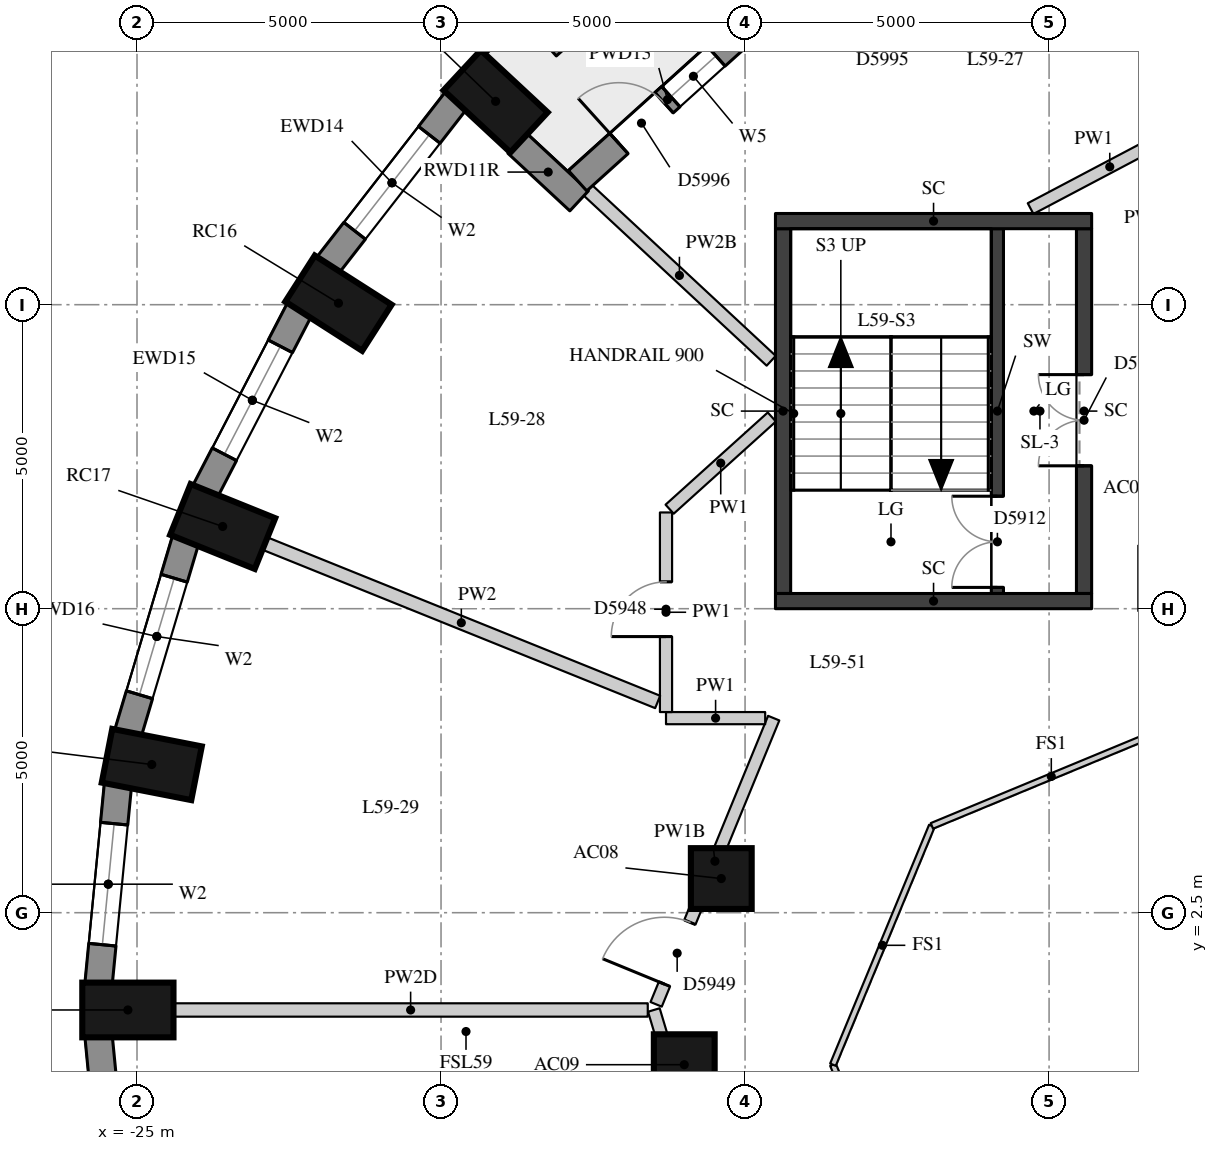
"""IFC4 building model, lengths in metres.
Left out: names, types, materials, properties, quantities, classifications, styles, units other than length and angle.
Written with IfcOpenShell. Run it as: python <this file> out.ifc"""

import sys

from ifc_helpers import new_model, si_unit, direction, frame, frame_2d, origin, origin_2d, place, context, subcontext, project, spatial, rectangle, extrude, element, fill, save


model = new_model("IFC4")
c1 = context("Model", 3, precision=1e-05, world=origin(), true_north=direction((0.0, 1.0)))
c2 = subcontext(c1, "Body", "Model", "MODEL_VIEW")
j1 = project(units=[si_unit("LENGTHUNIT", "METRE"), si_unit("PLANEANGLEUNIT", "RADIAN")], contexts=[c1])
p1 = place(None, origin())
s1 = spatial("IfcSite", under=j1, at=p1, CompositionType="ELEMENT")
p2 = place(p1, origin())
s2 = spatial("IfcBuilding", under=s1, at=p2, CompositionType="ELEMENT")
p3 = place(p2, frame((0.0, 0.0, 209.0)))
s3 = spatial("IfcBuildingStorey", under=s2, at=p3, CompositionType="ELEMENT", Elevation=209.0)
for number, where, z_axis, x_axis in (
    (1, (-19.102, 15.845, 0.0), (0.0, 0.0, 1.0), (-0.732, 0.681, 0.0)),
    (2, (-21.687, 12.525, 0.0), (0.0, 0.0, 1.0), (-0.842, 0.539, 0.0)),
    (3, (-23.591, 8.852, 0.0), (0.0, 0.0, 1.0), (-0.927, 0.374, 0.0)),
    (4, (-24.757, 4.937, 0.0), (0.0, 0.0, 1.0), (-0.981, 0.192, 0.0)),
    (5, (-25.15, 0.9, 0.0), (0.0, 0.0, 1.0), (-1.0, 0.0, 0.0)),
):
    element("IfcColumn", number, at=place(p3, frame(where, z_axis=z_axis, x_axis=x_axis)), inside=s3, PredefinedType="COLUMN", context=c2, shape_type="SweptSolid", body=[
        extrude(rectangle(XDim=1.5, YDim=0.9, at=origin_2d()), origin(), (0.0, 0.0, 1.0), 3.3),
    ])
for number, where, z_axis, x_axis in (
    (6, (-15.391, 3.062, 0.0), (0.0, 0.0, 1.0), (1.0, 0.0, 0.0)),
    (7, (-16.0, 0.0, 0.0), (0.0, 0.0, 1.0), (1.0, 0.0, 0.0)),
):
    element("IfcColumn", number, at=place(p3, frame(where, z_axis=z_axis, x_axis=x_axis)), inside=s3, PredefinedType="COLUMN", context=c2, shape_type="SweptSolid", body=[
        extrude(rectangle(XDim=1.0, YDim=1.0, at=origin_2d()), origin(), (0.0, 0.0, 1.0), 3.3),
    ])
p4 = place(p3, frame((-19.751, 15.861, 0.0), z_axis=(0.0, 0.0, 1.0), x_axis=(-0.614220816451, -0.789134201919, 0.0)))
e8 = element("IfcWall", 8, at=p4, inside=s3, PredefinedType="SOLIDWALL", context=c2, shape_type="SweptSolid", body=[
    extrude(rectangle(XDim=3.438, YDim=0.45, at=frame_2d((1.719, 0.0))), origin(), (0.0, 0.0, 1.0), 3.02),
])
p5 = place(p4, frame((0.719, 0.0, 0.4)))
e9 = element("IfcOpeningElement", 9, at=p5, cuts=e8, PredefinedType="OPENING", context=c2, shape_type="SweptSolid", body=[
    extrude(rectangle(XDim=2.0, YDim=1.75, at=frame_2d((1.0, 0.875))), frame((0.0, 0.235, 0.0), z_axis=(0.0, -1.0, 0.0), x_axis=(1.0, 0.0, 0.0)), (0.0, 0.0, 1.0), 0.47),
])
p6 = place(p3, frame((-22.327, 12.424, 0.0), z_axis=(0.0, 0.0, 1.0), x_axis=(-0.460232593174, -0.887798378113, 0.0)))
e10 = element("IfcWall", 10, at=p6, inside=s3, PredefinedType="SOLIDWALL", context=c2, shape_type="SweptSolid", body=[
    extrude(rectangle(XDim=3.371, YDim=0.45, at=frame_2d((1.685, 0.0))), origin(), (0.0, 0.0, 1.0), 3.02),
])
p7 = place(p6, frame((0.685, 0.0, 0.4)))
e11 = element("IfcOpeningElement", 11, at=p7, cuts=e10, PredefinedType="OPENING", context=c2, shape_type="SweptSolid", body=[
    extrude(rectangle(XDim=2.0, YDim=1.75, at=frame_2d((1.0, 0.875))), frame((0.0, 0.235, 0.0), z_axis=(0.0, -1.0, 0.0), x_axis=(1.0, 0.0, 0.0)), (0.0, 0.0, 1.0), 0.47),
])
p8 = place(p3, frame((-24.2, 8.634, 0.0), z_axis=(0.0, 0.0, 1.0), x_axis=(-0.285444972963, -0.958395099847, 0.0)))
e12 = element("IfcWall", 12, at=p8, inside=s3, PredefinedType="SOLIDWALL", context=c2, shape_type="SweptSolid", body=[
    extrude(rectangle(XDim=3.32, YDim=0.45, at=frame_2d((1.66, 0.0))), origin(), (0.0, 0.0, 1.0), 3.02),
])
p9 = place(p8, frame((0.66, 0.0, 0.4)))
e13 = element("IfcOpeningElement", 13, at=p9, cuts=e12, PredefinedType="OPENING", context=c2, shape_type="SweptSolid", body=[
    extrude(rectangle(XDim=2.0, YDim=1.75, at=frame_2d((1.0, 0.875))), frame((0.0, 0.235, 0.0), z_axis=(0.0, -1.0, 0.0), x_axis=(1.0, 0.0, 0.0)), (0.0, 0.0, 1.0), 0.47),
])
p10 = place(p3, frame((-25.313, 4.608, 0.0), z_axis=(0.0, 0.0, 1.0), x_axis=(-0.096824116835, -0.995301507283, 0.0)))
e14 = element("IfcWall", 14, at=p10, inside=s3, PredefinedType="SOLIDWALL", context=c2, shape_type="SweptSolid", body=[
    extrude(rectangle(XDim=3.293, YDim=0.45, at=frame_2d((1.646, 0.0))), origin(), (0.0, 0.0, 1.0), 3.02),
])
p11 = place(p10, frame((0.646, 0.0, 0.4)))
e15 = element("IfcOpeningElement", 15, at=p11, cuts=e14, PredefinedType="OPENING", context=c2, shape_type="SweptSolid", body=[
    extrude(rectangle(XDim=2.0, YDim=1.75, at=frame_2d((1.0, 0.875))), frame((0.0, 0.235, 0.0), z_axis=(0.0, -1.0, 0.0), x_axis=(1.0, 0.0, 0.0)), (0.0, 0.0, 1.0), 0.47),
])
p12 = place(p3, frame((-25.632, 0.47, 0.0), z_axis=(0.0, 0.0, 1.0), x_axis=(0.096816972749, -0.995302202242, 0.0)))
e16 = element("IfcWall", 16, at=p12, inside=s3, PredefinedType="SOLIDWALL", context=c2, shape_type="SweptSolid", body=[
    extrude(rectangle(XDim=3.293, YDim=0.45, at=frame_2d((1.646, 0.0))), origin(), (0.0, 0.0, 1.0), 3.02),
])
p13 = place(p12, frame((0.646, 0.0, 0.4)))
e17 = element("IfcOpeningElement", 17, at=p13, cuts=e16, PredefinedType="OPENING", context=c2, shape_type="SweptSolid", body=[
    extrude(rectangle(XDim=2.0, YDim=1.75, at=frame_2d((1.0, 0.875))), frame((0.0, 0.235, 0.0), z_axis=(0.0, -1.0, 0.0), x_axis=(1.0, 0.0, 0.0)), (0.0, 0.0, 1.0), 0.47),
])
p14 = place(p3, frame((-18.747, 15.155, 0.0), z_axis=(0.0, 0.0, 1.0), x_axis=(0.732349544388, -0.680928883831, 0.0)))
e18 = element("IfcWall", 18, at=p14, inside=s3, PredefinedType="SOLIDWALL", context=c2, shape_type="SweptSolid", body=[
    extrude(rectangle(XDim=1.391, YDim=0.45, at=frame_2d((0.696, 0.0))), origin(), (0.0, 0.0, 1.0), 2.57),
])
p15 = place(p3, frame((-14.799, 17.205, 0.0), z_axis=(0.0, 0.0, 1.0), x_axis=(-0.742488361714, -0.669858964798, 0.0)))
e19 = element("IfcWall", 19, at=p15, inside=s3, PredefinedType="SOLIDWALL", context=c2, shape_type="SweptSolid", body=[
    extrude(rectangle(XDim=3.98, YDim=0.45, at=frame_2d((1.99, 0.0))), origin(), (0.0, 0.0, 1.0), 3.02),
])
p16 = place(p15, frame((0.915, 0.0, 0.4)))
e20 = element("IfcOpeningElement", 20, at=p16, cuts=e19, PredefinedType="OPENING", context=c2, shape_type="SweptSolid", body=[
    extrude(rectangle(XDim=1.0, YDim=1.75, at=frame_2d((0.5, 0.875))), frame((0.0, 0.235, 0.0), z_axis=(0.0, -1.0, 0.0), x_axis=(1.0, 0.0, 0.0)), (0.0, 0.0, 1.0), 0.47),
])
p17 = place(p15, frame((2.065, 0.0, 0.0)))
e21 = element("IfcOpeningElement", 21, at=p17, cuts=e19, PredefinedType="OPENING", context=c2, shape_type="SweptSolid", body=[
    extrude(rectangle(XDim=1.0, YDim=2.15, at=frame_2d((0.5, 1.075))), frame((0.0, 0.235, 0.0), z_axis=(0.0, -1.0, 0.0), x_axis=(1.0, 0.0, 0.0)), (0.0, 0.0, 1.0), 0.47),
])
p18 = place(p3, frame((-17.0, 18.055, 0.0), z_axis=(0.0, 0.0, 1.0), x_axis=(-0.743422275143, -0.668822338758, 0.0)))
e22 = element("IfcWall", 22, at=p18, inside=s3, PredefinedType="USERDEFINED", context=c2, shape_type="SweptSolid", body=[
    extrude(rectangle(XDim=1.8, YDim=0.7, at=frame_2d((0.9, 0.0))), origin(), (0.0, 0.0, 1.0), 0.75),
])
p19 = place(p3, frame((-10.85, 7.75, 0.0), z_axis=(0.0, 0.0, 1.0), x_axis=(0.0, 1.0, 0.0)))
e23 = element("IfcWall", 23, at=p19, inside=s3, PredefinedType="SHEAR", context=c2, shape_type="SweptSolid", body=[
    extrude(rectangle(XDim=6.0, YDim=0.2, at=frame_2d((3.0, 0.0))), origin(), (0.0, 0.0, 1.0), 3.02),
])
p20 = place(p19, frame((0.1, 0.0, 0.0)))
e24 = element("IfcOpeningElement", 24, at=p20, cuts=e23, PredefinedType="OPENING", context=c2, shape_type="SweptSolid", body=[
    extrude(rectangle(XDim=1.5, YDim=2.1, at=frame_2d((0.75, 1.05))), frame((0.0, 0.11, 0.0), z_axis=(0.0, -1.0, 0.0), x_axis=(1.0, 0.0, 0.0)), (0.0, 0.0, 1.0), 0.22),
])
p21 = place(p3, frame((-14.375, 7.75, -0.28), z_axis=(0.0, 0.0, 1.0), x_axis=(0.0, 1.0, 0.0)))
e25 = element("IfcWall", 25, at=p21, inside=s3, PredefinedType="SHEAR", context=c2, shape_type="SweptSolid", body=[
    extrude(rectangle(XDim=6.0, YDim=0.25, at=frame_2d((3.0, 0.0))), origin(), (0.0, 0.0, 1.0), 3.3),
])
p22 = place(p3, frame((-9.425, 7.75, -0.28), z_axis=(0.0, 0.0, 1.0), x_axis=(0.0, 1.0, 0.0)))
e26 = element("IfcWall", 26, at=p22, inside=s3, PredefinedType="SHEAR", context=c2, shape_type="SweptSolid", body=[
    extrude(rectangle(XDim=6.0, YDim=0.25, at=frame_2d((3.0, 0.0))), origin(), (0.0, 0.0, 1.0), 3.3),
])
p23 = place(p22, frame((2.1, 0.0, 0.28)))
e27 = element("IfcOpeningElement", 27, at=p23, cuts=e26, PredefinedType="OPENING", context=c2, shape_type="SweptSolid", body=[
    extrude(rectangle(XDim=1.5, YDim=2.1, at=frame_2d((0.75, 1.05))), frame((0.0, 0.135, 0.0), z_axis=(0.0, -1.0, 0.0), x_axis=(1.0, 0.0, 0.0)), (0.0, 0.0, 1.0), 0.27),
])
for number, where, z_axis, x_axis in (
    (28, (-14.5, 13.875, -0.28), (0.0, 0.0, 1.0), (1.0, 0.0, 0.0)),
    (29, (-14.5, 7.625, -0.28), (0.0, 0.0, 1.0), (1.0, 0.0, 0.0)),
):
    element("IfcWall", number, at=place(p3, frame(where, z_axis=z_axis, x_axis=x_axis)), inside=s3, PredefinedType="SHEAR", context=c2, shape_type="SweptSolid", body=[
        extrude(rectangle(XDim=5.2, YDim=0.25, at=frame_2d((2.6, 0.0))), origin(), (0.0, 0.0, 1.0), 3.3),
    ])
p24 = place(p3, frame((-14.56, -5.567, 0.0), z_axis=(0.0, 0.0, 1.0), x_axis=(-0.287410918602, 0.95780737305, 0.0)))
e30 = element("IfcWall", 30, at=p24, inside=s3, PredefinedType="PARTITIONING", context=c2, shape_type="SweptSolid", body=[
    extrude(rectangle(XDim=6.751, YDim=0.2, at=frame_2d((3.376, 0.0))), origin(), (0.0, 0.0, 1.0), 2.52),
])
p25 = place(p24, frame((3.561, 0.0, 0.0)))
e31 = element("IfcOpeningElement", 31, at=p25, cuts=e30, PredefinedType="OPENING", context=c2, shape_type="SweptSolid", body=[
    extrude(rectangle(XDim=1.1, YDim=2.1, at=frame_2d((0.55, 1.05))), frame((0.0, 0.11, 0.0), z_axis=(0.0, -1.0, 0.0), x_axis=(1.0, 0.0, 0.0)), (0.0, 0.0, 1.0), 0.22),
])
p26 = place(p24, frame((0.41, 0.0, 0.0)))
e32 = element("IfcOpeningElement", 32, at=p26, cuts=e30, PredefinedType="OPENING", context=c2, shape_type="SweptSolid", body=[
    extrude(rectangle(XDim=1.2, YDim=2.1, at=frame_2d((0.6, 1.05))), frame((0.0, 0.11, 0.0), z_axis=(0.0, -1.0, 0.0), x_axis=(1.0, 0.0, 0.0)), (0.0, 0.0, 1.0), 0.22),
])
p27 = place(p3, frame((-16.462, 0.993, 0.0), z_axis=(0.0, 0.0, 1.0), x_axis=(0.37991958703, 0.925019517303, 0.0)))
e33 = element("IfcWall", 33, at=p27, inside=s3, PredefinedType="PARTITIONING", context=c2, shape_type="SweptSolid", body=[
    extrude(rectangle(XDim=5.089, YDim=0.2, at=frame_2d((2.544, 0.0))), origin(), (0.0, 0.0, 1.0), 2.52),
])
p28 = place(p27, frame((0.36, 0.0, 0.0)))
e34 = element("IfcOpeningElement", 34, at=p28, cuts=e33, PredefinedType="OPENING", context=c2, shape_type="SweptSolid", body=[
    extrude(rectangle(XDim=1.1, YDim=2.1, at=frame_2d((0.55, 1.05))), frame((0.0, 0.11, 0.0), z_axis=(0.0, -1.0, 0.0), x_axis=(1.0, 0.0, 0.0)), (0.0, 0.0, 1.0), 0.22),
])
p29 = place(p3, frame((-14.669, 5.7, 0.0), z_axis=(0.0, 0.0, 1.0), x_axis=(-1.0, 0.0, 0.0)))
e35 = element("IfcWall", 35, at=p29, inside=s3, PredefinedType="PARTITIONING", context=c2, shape_type="SweptSolid", body=[
    extrude(rectangle(XDim=1.631, YDim=0.2, at=frame_2d((0.815, 0.0))), origin(), (0.0, 0.0, 1.0), 3.02),
])
p30 = place(p3, frame((-16.3, 5.8, 0.0), z_axis=(0.0, 0.0, 1.0), x_axis=(0.0, 1.0, 0.0)))
e36 = element("IfcWall", 36, at=p30, inside=s3, PredefinedType="PARTITIONING", context=c2, shape_type="SweptSolid", body=[
    extrude(rectangle(XDim=3.283, YDim=0.2, at=frame_2d((1.641, 0.0))), origin(), (0.0, 0.0, 1.0), 3.02),
])
p31 = place(p30, frame((1.241, 0.0, 0.0)))
e37 = element("IfcOpeningElement", 37, at=p31, cuts=e36, PredefinedType="OPENING", context=c2, shape_type="SweptSolid", body=[
    extrude(rectangle(XDim=0.9, YDim=2.1, at=frame_2d((0.45, 1.05))), frame((0.0, 0.11, 0.0), z_axis=(0.0, -1.0, 0.0), x_axis=(1.0, 0.0, 0.0)), (0.0, 0.0, 1.0), 0.22),
])
p32 = place(p3, frame((-16.24, 9.136, 0.0), z_axis=(0.0, 0.0, 1.0), x_axis=(0.74251608424, 0.66982823518, 0.0)))
e38 = element("IfcWall", 38, at=p32, inside=s3, PredefinedType="PARTITIONING", context=c2, shape_type="SweptSolid", body=[
    extrude(rectangle(XDim=2.264, YDim=0.2, at=frame_2d((1.132, 0.0))), origin(), (0.0, 0.0, 1.0), 3.02),
])
p33 = place(p3, frame((-10.304, 14.081, 0.0), z_axis=(0.0, 0.0, 1.0), x_axis=(0.884325802624, 0.466870297635, 0.0)))
e39 = element("IfcWall", 39, at=p33, inside=s3, PredefinedType="PARTITIONING", context=c2, shape_type="SweptSolid", body=[
    extrude(rectangle(XDim=2.945, YDim=0.2, at=frame_2d((1.472, 0.0))), origin(), (0.0, 0.0, 1.0), 3.02),
])
p34 = place(p3, frame((-17.589, 14.385, 0.0), z_axis=(0.0, 0.0, 1.0), x_axis=(0.732287016614, -0.680996127227, 0.0)))
e40 = element("IfcWall", 40, at=p34, inside=s3, PredefinedType="PARTITIONING", context=c2, shape_type="SweptSolid", body=[
    extrude(rectangle(XDim=4.122, YDim=0.22, at=frame_2d((2.061, 0.0))), origin(), (0.0, 0.0, 1.0), 2.57),
])
p35 = place(p3, frame((-22.896, 8.571, 0.0), z_axis=(0.0, 0.0, 1.0), x_axis=(0.927387137769, -0.374103056256, 0.0)))
e41 = element("IfcWall", 41, at=p35, inside=s3, PredefinedType="PARTITIONING", context=c2, shape_type="SweptSolid", body=[
    extrude(rectangle(XDim=6.964, YDim=0.22, at=frame_2d((3.482, 0.0))), origin(), (0.0, 0.0, 1.0), 3.02),
])
p36 = place(p3, frame((-24.4, 0.9, 0.0), z_axis=(0.0, 0.0, 1.0), x_axis=(1.0, 0.0, 0.0)))
e42 = element("IfcWall", 42, at=p36, inside=s3, PredefinedType="PARTITIONING", context=c2, shape_type="SweptSolid", body=[
    extrude(rectangle(XDim=7.8, YDim=0.22, at=frame_2d((3.9, 0.0))), origin(), (0.0, 0.0, 1.0), 2.47),
])
for number, where, z_axis, x_axis in (
    (43, (-11.927, -3.927, 0.0), (0.0, 0.0, 1.0), (-0.383, 0.924, 0.0)),
    (44, (-13.554, 0.0, 0.0), (0.0, 0.0, 1.0), (0.383, 0.924, 0.0)),
    (45, (-11.927, 3.927, 0.0), (0.0, 0.0, 1.0), (0.924, 0.383, 0.0)),
):
    element("IfcWall", number, at=place(p3, frame(where, z_axis=z_axis, x_axis=x_axis)), inside=s3, PredefinedType="PARTITIONING", context=c2, shape_type="SweptSolid", body=[
        extrude(rectangle(XDim=4.251, YDim=0.1, at=frame_2d((2.125, 0.0))), origin(), (0.0, 0.0, 1.0), 3.02),
    ])
p37 = place(p5, origin())
e46 = element("IfcWindow", 46, at=p37, inside=s3, PartitioningType="SINGLE_PANEL", PredefinedType="WINDOW", context=c2, shape_type="SweptSolid", body=[
    extrude(rectangle(XDim=2.0, YDim=1.75, at=frame_2d((1.0, 0.875))), frame((0.0, 0.035, 0.0), z_axis=(0.0, -1.0, 0.0), x_axis=(1.0, 0.0, 0.0)), (0.0, 0.0, 1.0), 0.06),
])
fill(e9, e46)
p38 = place(p7, origin())
e47 = element("IfcWindow", 47, at=p38, inside=s3, PartitioningType="SINGLE_PANEL", PredefinedType="WINDOW", context=c2, shape_type="SweptSolid", body=[
    extrude(rectangle(XDim=2.0, YDim=1.75, at=frame_2d((1.0, 0.875))), frame((0.0, 0.035, 0.0), z_axis=(0.0, -1.0, 0.0), x_axis=(1.0, 0.0, 0.0)), (0.0, 0.0, 1.0), 0.06),
])
fill(e11, e47)
p39 = place(p9, origin())
e48 = element("IfcWindow", 48, at=p39, inside=s3, PartitioningType="SINGLE_PANEL", PredefinedType="WINDOW", context=c2, shape_type="SweptSolid", body=[
    extrude(rectangle(XDim=2.0, YDim=1.75, at=frame_2d((1.0, 0.875))), frame((0.0, 0.035, 0.0), z_axis=(0.0, -1.0, 0.0), x_axis=(1.0, 0.0, 0.0)), (0.0, 0.0, 1.0), 0.06),
])
fill(e13, e48)
p40 = place(p11, origin())
e49 = element("IfcWindow", 49, at=p40, inside=s3, PartitioningType="SINGLE_PANEL", PredefinedType="WINDOW", context=c2, shape_type="SweptSolid", body=[
    extrude(rectangle(XDim=2.0, YDim=1.75, at=frame_2d((1.0, 0.875))), frame((0.0, 0.035, 0.0), z_axis=(0.0, -1.0, 0.0), x_axis=(1.0, 0.0, 0.0)), (0.0, 0.0, 1.0), 0.06),
])
fill(e15, e49)
p41 = place(p16, origin())
e50 = element("IfcWindow", 50, at=p41, inside=s3, PartitioningType="SINGLE_PANEL", PredefinedType="WINDOW", context=c2, shape_type="SweptSolid", body=[
    extrude(rectangle(XDim=1.0, YDim=1.75, at=frame_2d((0.5, 0.875))), frame((0.0, 0.035, 0.0), z_axis=(0.0, -1.0, 0.0), x_axis=(1.0, 0.0, 0.0)), (0.0, 0.0, 1.0), 0.06),
])
fill(e20, e50)
p42 = place(p17, frame((1.0, 0.0, 0.0), z_axis=(0.0, 0.0, 1.0), x_axis=(-1.0, 0.0, 0.0)))
e51 = element("IfcDoor", 51, at=p42, inside=s3, OperationType="SINGLE_SWING_LEFT", PredefinedType="DOOR", context=c2, shape_type="SweptSolid", body=[
    extrude(rectangle(XDim=1.0, YDim=2.15, at=frame_2d((0.5, 1.075))), frame((0.0, 0.075, 0.0), z_axis=(0.0, -1.0, 0.0), x_axis=(1.0, 0.0, 0.0)), (0.0, 0.0, 1.0), 0.05),
])
fill(e21, e51)
p43 = place(p20, origin())
e52 = element("IfcDoor", 52, at=p43, inside=s3, OperationType="DOUBLE_DOOR_SINGLE_SWING", PredefinedType="DOOR", context=c2, shape_type="SweptSolid", body=[
    extrude(rectangle(XDim=1.5, YDim=2.1, at=frame_2d((0.75, 1.05))), frame((0.0, 0.025, 0.0), z_axis=(0.0, -1.0, 0.0), x_axis=(1.0, 0.0, 0.0)), (0.0, 0.0, 1.0), 0.05),
])
fill(e24, e52)
p44 = place(p23, origin())
e53 = element("IfcDoor", 53, at=p44, inside=s3, OperationType="DOUBLE_DOOR_SINGLE_SWING", PredefinedType="DOOR", context=c2, shape_type="SweptSolid", body=[
    extrude(rectangle(XDim=1.5, YDim=2.1, at=frame_2d((0.75, 1.05))), frame((0.0, 0.025, 0.0), z_axis=(0.0, -1.0, 0.0), x_axis=(1.0, 0.0, 0.0)), (0.0, 0.0, 1.0), 0.05),
])
fill(e27, e53)
p45 = place(p31, origin())
e54 = element("IfcDoor", 54, at=p45, inside=s3, OperationType="SINGLE_SWING_LEFT", PredefinedType="DOOR", context=c2, shape_type="SweptSolid", body=[
    extrude(rectangle(XDim=0.9, YDim=2.1, at=frame_2d((0.45, 1.05))), frame((0.0, 0.025, 0.0), z_axis=(0.0, -1.0, 0.0), x_axis=(1.0, 0.0, 0.0)), (0.0, 0.0, 1.0), 0.05),
])
fill(e37, e54)
p46 = place(p28, origin())
e55 = element("IfcDoor", 55, at=p46, inside=s3, OperationType="SINGLE_SWING_LEFT", PredefinedType="DOOR", context=c2, shape_type="SweptSolid", body=[
    extrude(rectangle(XDim=1.1, YDim=2.1, at=frame_2d((0.55, 1.05))), frame((0.0, 0.025, 0.0), z_axis=(0.0, -1.0, 0.0), x_axis=(1.0, 0.0, 0.0)), (0.0, 0.0, 1.0), 0.05),
])
fill(e34, e55)
save(model, sys.argv[1])
